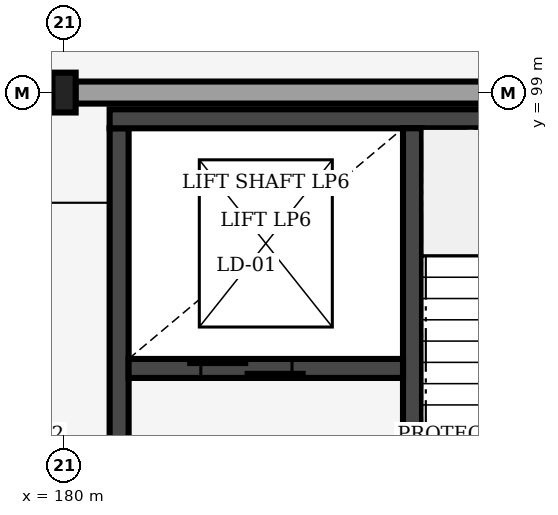
"""IFC4 building model, lengths in metres.
Left out: names, types, materials, properties, quantities, classifications, styles, units other than length and angle.
Written with IfcOpenShell. Run it as: python <this file> out.ifc"""

import sys

from ifc_helpers import new_model, si_unit, direction, frame, frame_2d, origin, origin_2d, place, context, subcontext, project, spatial, rectangle, i_section, extrude, element, fill, save


model = new_model("IFC4")
c1 = context("Model", 3, precision=1e-05, world=origin(), true_north=direction((0.0, 1.0)))
c2 = subcontext(c1, "Body", "Model", "MODEL_VIEW")
j1 = project(units=[si_unit("LENGTHUNIT", "METRE"), si_unit("PLANEANGLEUNIT", "RADIAN")], contexts=[c1])
p1 = place(None, origin())
s1 = spatial("IfcSite", under=j1, at=p1, CompositionType="ELEMENT")
p2 = place(p1, origin())
s2 = spatial("IfcBuilding", under=s1, at=p2, CompositionType="ELEMENT")
p3 = place(p2, frame((0.0, 0.0, 12.0)))
s3 = spatial("IfcBuildingStorey", under=s2, at=p3, CompositionType="ELEMENT", Elevation=12.0)
p4 = place(p3, frame((180.0, 99.0, 0.0), z_axis=(0.0, 0.0, 1.0), x_axis=(1.0, 0.0, 0.0)))
e1 = element("IfcColumn", 1, at=p4, inside=s3, PredefinedType="COLUMN", context=c2, shape_type="SweptSolid", body=[
    extrude(i_section(OverallWidth=0.306, OverallDepth=0.524, WebThickness=0.021, FlangeThickness=0.04, FilletRadius=0.027, at=origin_2d()), origin(), (0.0, 0.0, 1.0), 6.0),
])
p5 = place(p3, frame((180.148, 99.0, 0.0), z_axis=(0.0, 0.0, 1.0), x_axis=(1.0, 0.0, 0.0)))
e2 = element("IfcWall", 2, at=p5, inside=s3, PredefinedType="SOLIDWALL", context=c2, shape_type="SweptSolid", body=[
    extrude(rectangle(XDim=11.557, YDim=0.29, at=frame_2d((5.779, 0.0))), origin(), (0.0, 0.0, 1.0), 4.8),
])
p6 = place(p3, frame((180.725, 90.47, 0.0), z_axis=(0.0, 0.0, 1.0), x_axis=(0.0, 1.0, 0.0)))
e3 = element("IfcWall", 3, at=p6, inside=s3, PredefinedType="SHEAR", context=c2, shape_type="SweptSolid", body=[
    extrude(rectangle(XDim=8.06, YDim=0.25, at=frame_2d((4.03, 0.0))), origin(), (0.0, 0.0, 1.0), 5.64),
])
p7 = place(p6, frame((1.15, 0.0, 0.0)))
e4 = element("IfcOpeningElement", 4, at=p7, cuts=e3, PredefinedType="OPENING", context=c2, shape_type="SweptSolid", body=[
    extrude(rectangle(XDim=1.6, YDim=2.2, at=frame_2d((0.8, 1.1))), frame((0.0, 0.135, 0.0), z_axis=(0.0, -1.0, 0.0), x_axis=(1.0, 0.0, 0.0)), (0.0, 0.0, 1.0), 0.27),
])
p8 = place(p3, frame((180.6, 98.655, 0.0), z_axis=(0.0, 0.0, 1.0), x_axis=(1.0, 0.0, 0.0)))
e5 = element("IfcWall", 5, at=p8, inside=s3, PredefinedType="SHEAR", context=c2, shape_type="SweptSolid", body=[
    extrude(rectangle(XDim=7.8, YDim=0.25, at=frame_2d((3.9, 0.0))), origin(), (0.0, 0.0, 1.0), 5.64),
])
p9 = place(p3, frame((184.585, 90.47, 0.0), z_axis=(0.0, 0.0, 1.0), x_axis=(0.0, 1.0, 0.0)))
e6 = element("IfcWall", 6, at=p9, inside=s3, PredefinedType="SHEAR", context=c2, shape_type="SweptSolid", body=[
    extrude(rectangle(XDim=8.06, YDim=0.25, at=frame_2d((4.03, 0.0))), origin(), (0.0, 0.0, 1.0), 5.64),
])
p10 = place(p9, frame((0.25, 0.0, 0.0)))
e7 = element("IfcOpeningElement", 7, at=p10, cuts=e6, PredefinedType="OPENING", context=c2, shape_type="SweptSolid", body=[
    extrude(rectangle(XDim=1.15, YDim=2.15, at=frame_2d((0.575, 1.075))), frame((0.0, 0.135, 0.0), z_axis=(0.0, -1.0, 0.0), x_axis=(1.0, 0.0, 0.0)), (0.0, 0.0, 1.0), 0.27),
])
p11 = place(p3, frame((180.85, 95.37, 0.0), z_axis=(0.0, 0.0, 1.0), x_axis=(1.0, 0.0, 0.0)))
e8 = element("IfcWall", 8, at=p11, inside=s3, PredefinedType="SHEAR", context=c2, shape_type="SweptSolid", body=[
    extrude(rectangle(XDim=3.61, YDim=0.25, at=frame_2d((1.805, 0.0))), origin(), (0.0, 0.0, 1.0), 5.64),
])
p12 = place(p11, frame((0.95, 0.0, 0.0)))
e9 = element("IfcOpeningElement", 9, at=p12, cuts=e8, PredefinedType="OPENING", context=c2, shape_type="SweptSolid", body=[
    extrude(rectangle(XDim=1.2, YDim=2.2, at=frame_2d((0.6, 1.1))), frame((0.0, 0.135, 0.0), z_axis=(0.0, -1.0, 0.0), x_axis=(1.0, 0.0, 0.0)), (0.0, 0.0, 1.0), 0.27),
])
p13 = place(p12, origin())
e10 = element("IfcDoor", 10, at=p13, inside=s3, OperationType="DOUBLE_DOOR_SLIDING", PredefinedType="DOOR", context=c2, shape_type="SweptSolid", body=[
    extrude(rectangle(XDim=1.2, YDim=2.2, at=frame_2d((0.6, 1.1))), frame((0.0, 0.025, 0.0), z_axis=(0.0, -1.0, 0.0), x_axis=(1.0, 0.0, 0.0)), (0.0, 0.0, 1.0), 0.05),
])
fill(e9, e10)
save(model, sys.argv[1])
